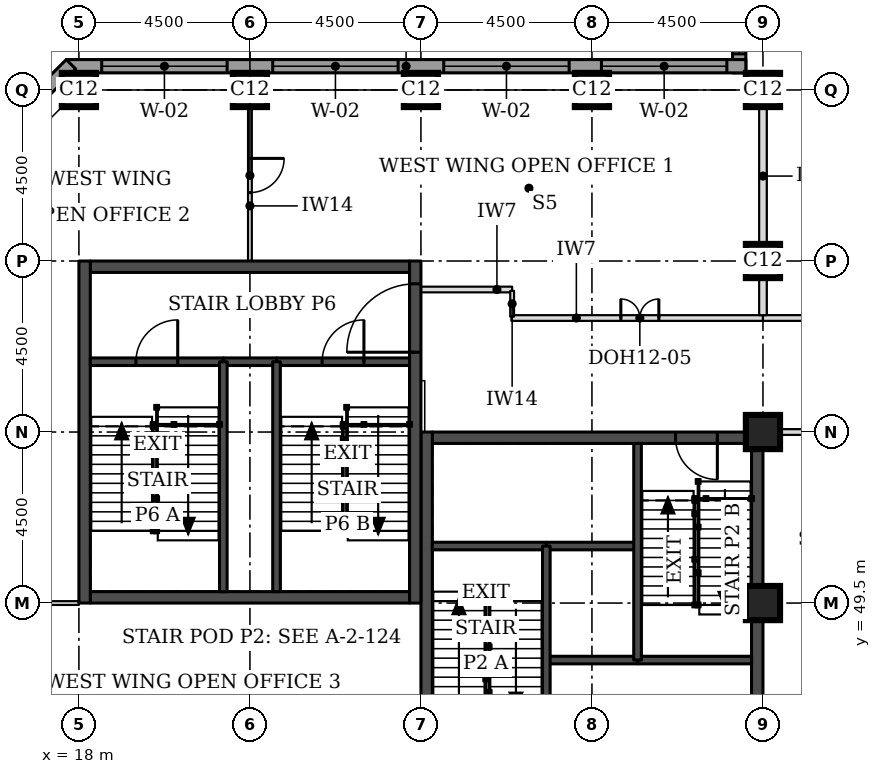
"""IFC4 building model, lengths in metres.
Left out: names, types, materials, properties, quantities, classifications, styles, units other than length and angle.
Written with IfcOpenShell. Run it as: python <this file> out.ifc"""

import sys

from ifc_helpers import new_model, si_unit, direction, frame, frame_2d, origin, origin_2d, place, context, subcontext, project, spatial, rectangle, extrude, element, fill, save


model = new_model("IFC4")
c1 = context("Model", 3, precision=1e-05, world=origin(), true_north=direction((0.0, 1.0)))
c2 = subcontext(c1, "Body", "Model", "MODEL_VIEW")
j1 = project(units=[si_unit("LENGTHUNIT", "METRE"), si_unit("PLANEANGLEUNIT", "RADIAN")], contexts=[c1])
p1 = place(None, origin())
s1 = spatial("IfcSite", under=j1, at=p1, CompositionType="ELEMENT")
p2 = place(p1, origin())
s2 = spatial("IfcBuilding", under=s1, at=p2, CompositionType="ELEMENT")
p3 = place(p2, frame((0.0, 0.0, 252.6)))
s3 = spatial("IfcBuildingStorey", under=s2, at=p3, CompositionType="ELEMENT", Elevation=252.6)
for number, where, z_axis, x_axis in (
    (1, (36.0, 49.5, 0.0), (0.0, 0.0, 1.0), (1.0, 0.0, 0.0)),
    (2, (36.0, 54.0, 0.0), (0.0, 0.0, 1.0), (1.0, 0.0, 0.0)),
    (3, (36.0, 58.5, 0.0), (0.0, 0.0, 1.0), (1.0, 0.0, 0.0)),
    (4, (18.0, 63.0, 0.0), (0.0, 0.0, 1.0), (1.0, 0.0, 0.0)),
    (5, (22.5, 63.0, 0.0), (0.0, 0.0, 1.0), (1.0, 0.0, 0.0)),
    (6, (27.0, 63.0, 0.0), (0.0, 0.0, 1.0), (1.0, 0.0, 0.0)),
    (7, (31.5, 63.0, 0.0), (0.0, 0.0, 1.0), (1.0, 0.0, 0.0)),
    (8, (36.0, 63.0, 0.0), (0.0, 0.0, 1.0), (1.0, 0.0, 0.0)),
):
    element("IfcColumn", number, at=place(p3, frame(where, z_axis=z_axis, x_axis=x_axis)), inside=s3, PredefinedType="COLUMN", context=c2, shape_type="SweptSolid", body=[
        extrude(rectangle(XDim=0.9, YDim=0.9, at=origin_2d()), origin(), (0.0, 0.0, 1.0), 3.7),
    ])
p4 = place(p3, frame((27.3, 53.85, 0.0), z_axis=(0.0, 0.0, 1.0), x_axis=(1.0, 0.0, 0.0)))
e9 = element("IfcWall", 9, at=p4, inside=s3, PredefinedType="SHEAR", context=c2, shape_type="SweptSolid", body=[
    extrude(rectangle(XDim=8.4, YDim=0.3, at=frame_2d((4.2, 0.0))), origin(), (0.0, 0.0, 1.0), 3.7),
])
p5 = place(p4, frame((6.4, 0.0, 0.0)))
e10 = element("IfcOpeningElement", 10, at=p5, cuts=e9, PredefinedType="OPENING", context=c2, shape_type="SweptSolid", body=[
    extrude(rectangle(XDim=1.1, YDim=2.1, at=frame_2d((0.55, 1.05))), frame((0.0, 0.16, 0.0), z_axis=(0.0, -1.0, 0.0), x_axis=(1.0, 0.0, 0.0)), (0.0, 0.0, 1.0), 0.32),
])
p6 = place(p3, frame((27.15, 45.0, 0.0), z_axis=(0.0, 0.0, 1.0), x_axis=(0.0, 1.0, 0.0)))
e11 = element("IfcWall", 11, at=p6, inside=s3, PredefinedType="SHEAR", context=c2, shape_type="SweptSolid", body=[
    extrude(rectangle(XDim=9.0, YDim=0.3, at=frame_2d((4.5, 0.0))), origin(), (0.0, 0.0, 1.0), 3.7),
])
p7 = place(p6, frame((0.4, 0.0, 0.0)))
e12 = element("IfcOpeningElement", 12, at=p7, cuts=e11, PredefinedType="OPENING", context=c2, shape_type="SweptSolid", body=[
    extrude(rectangle(XDim=1.1, YDim=2.1, at=frame_2d((0.55, 1.05))), frame((0.0, 0.16, 0.0), z_axis=(0.0, -1.0, 0.0), x_axis=(1.0, 0.0, 0.0)), (0.0, 0.0, 1.0), 0.32),
])
p8 = place(p3, frame((35.85, 45.0, 0.0), z_axis=(0.0, 0.0, 1.0), x_axis=(0.0, 1.0, 0.0)))
e13 = element("IfcWall", 13, at=p8, inside=s3, PredefinedType="SHEAR", context=c2, shape_type="SweptSolid", body=[
    extrude(rectangle(XDim=9.0, YDim=0.3, at=frame_2d((4.5, 0.0))), origin(), (0.0, 0.0, 1.0), 3.7),
])
for number, where, z_axis, x_axis in (
    (14, (18.3, 49.65, 0.0), (0.0, 0.0, 1.0), (1.0, 0.0, 0.0)),
    (15, (18.3, 58.35, 0.0), (0.0, 0.0, 1.0), (1.0, 0.0, 0.0)),
):
    element("IfcWall", number, at=place(p3, frame(where, z_axis=z_axis, x_axis=x_axis)), inside=s3, PredefinedType="SHEAR", context=c2, shape_type="SweptSolid", body=[
        extrude(rectangle(XDim=8.4, YDim=0.3, at=frame_2d((4.2, 0.0))), origin(), (0.0, 0.0, 1.0), 3.7),
    ])
p9 = place(p3, frame((18.15, 49.5, 0.0), z_axis=(0.0, 0.0, 1.0), x_axis=(0.0, 1.0, 0.0)))
e16 = element("IfcWall", 16, at=p9, inside=s3, PredefinedType="SHEAR", context=c2, shape_type="SweptSolid", body=[
    extrude(rectangle(XDim=9.0, YDim=0.3, at=frame_2d((4.5, 0.0))), origin(), (0.0, 0.0, 1.0), 3.7),
])
p10 = place(p3, frame((26.85, 49.5, 0.0), z_axis=(0.0, 0.0, 1.0), x_axis=(0.0, 1.0, 0.0)))
e17 = element("IfcWall", 17, at=p10, inside=s3, PredefinedType="SHEAR", context=c2, shape_type="SweptSolid", body=[
    extrude(rectangle(XDim=9.0, YDim=0.3, at=frame_2d((4.5, 0.0))), origin(), (0.0, 0.0, 1.0), 3.7),
])
p11 = place(p10, frame((6.6, 0.0, 0.0)))
e18 = element("IfcOpeningElement", 18, at=p11, cuts=e17, PredefinedType="OPENING", context=c2, shape_type="SweptSolid", body=[
    extrude(rectangle(XDim=1.8, YDim=2.1, at=frame_2d((0.9, 1.05))), frame((0.0, 0.16, 0.0), z_axis=(0.0, -1.0, 0.0), x_axis=(1.0, 0.0, 0.0)), (0.0, 0.0, 1.0), 0.32),
])
p12 = place(p3, frame((35.375, 76.831, 0.0), z_axis=(0.0, 0.0, 1.0), x_axis=(0.0, -1.0, 0.0)))
e19 = element("IfcWall", 19, at=p12, inside=s3, PredefinedType="STANDARD", context=c2, shape_type="SweptSolid", body=[
    extrude(rectangle(XDim=13.381, YDim=0.35, at=frame_2d((6.691, 0.0))), origin(), (0.0, 0.0, 1.0), 3.525),
])
p13 = place(p12, frame((0.931, 0.0, 0.9)))
e20 = element("IfcOpeningElement", 20, at=p13, cuts=e19, PredefinedType="OPENING", context=c2, shape_type="SweptSolid", body=[
    extrude(rectangle(XDim=3.3, YDim=1.9, at=frame_2d((1.65, 0.95))), frame((0.0, 0.185, 0.0), z_axis=(0.0, -1.0, 0.0), x_axis=(1.0, 0.0, 0.0)), (0.0, 0.0, 1.0), 0.37),
])
p14 = place(p12, frame((5.431, 0.0, 0.9)))
e21 = element("IfcOpeningElement", 21, at=p14, cuts=e19, PredefinedType="OPENING", context=c2, shape_type="SweptSolid", body=[
    extrude(rectangle(XDim=3.3, YDim=1.9, at=frame_2d((1.65, 0.95))), frame((0.0, 0.185, 0.0), z_axis=(0.0, -1.0, 0.0), x_axis=(1.0, 0.0, 0.0)), (0.0, 0.0, 1.0), 0.37),
])
p15 = place(p12, frame((9.581, 0.0, 0.9)))
e22 = element("IfcOpeningElement", 22, at=p15, cuts=e19, PredefinedType="OPENING", context=c2, shape_type="SweptSolid", body=[
    extrude(rectangle(XDim=3.3, YDim=1.9, at=frame_2d((1.65, 0.95))), frame((0.0, 0.185, 0.0), z_axis=(0.0, -1.0, 0.0), x_axis=(1.0, 0.0, 0.0)), (0.0, 0.0, 1.0), 0.37),
])
p16 = place(p3, frame((35.55, 63.625, 0.0), z_axis=(0.0, 0.0, 1.0), x_axis=(-1.0, 0.0, 0.0)))
e23 = element("IfcWall", 23, at=p16, inside=s3, PredefinedType="STANDARD", context=c2, shape_type="SweptSolid", body=[
    extrude(rectangle(XDim=17.881, YDim=0.35, at=frame_2d((8.941, 0.0))), origin(), (0.0, 0.0, 1.0), 3.525),
])
p17 = place(p16, frame((0.5, 0.0, 0.9)))
e24 = element("IfcOpeningElement", 24, at=p17, cuts=e23, PredefinedType="OPENING", context=c2, shape_type="SweptSolid", body=[
    extrude(rectangle(XDim=3.3, YDim=1.9, at=frame_2d((1.65, 0.95))), frame((0.0, 0.185, 0.0), z_axis=(0.0, -1.0, 0.0), x_axis=(1.0, 0.0, 0.0)), (0.0, 0.0, 1.0), 0.37),
])
p18 = place(p16, frame((4.65, 0.0, 0.9)))
e25 = element("IfcOpeningElement", 25, at=p18, cuts=e23, PredefinedType="OPENING", context=c2, shape_type="SweptSolid", body=[
    extrude(rectangle(XDim=3.3, YDim=1.9, at=frame_2d((1.65, 0.95))), frame((0.0, 0.185, 0.0), z_axis=(0.0, -1.0, 0.0), x_axis=(1.0, 0.0, 0.0)), (0.0, 0.0, 1.0), 0.37),
])
p19 = place(p16, frame((9.15, 0.0, 0.9)))
e26 = element("IfcOpeningElement", 26, at=p19, cuts=e23, PredefinedType="OPENING", context=c2, shape_type="SweptSolid", body=[
    extrude(rectangle(XDim=3.3, YDim=1.9, at=frame_2d((1.65, 0.95))), frame((0.0, 0.185, 0.0), z_axis=(0.0, -1.0, 0.0), x_axis=(1.0, 0.0, 0.0)), (0.0, 0.0, 1.0), 0.37),
])
p20 = place(p16, frame((13.65, 0.0, 0.9)))
e27 = element("IfcOpeningElement", 27, at=p20, cuts=e23, PredefinedType="OPENING", context=c2, shape_type="SweptSolid", body=[
    extrude(rectangle(XDim=3.3, YDim=1.9, at=frame_2d((1.65, 0.95))), frame((0.0, 0.185, 0.0), z_axis=(0.0, -1.0, 0.0), x_axis=(1.0, 0.0, 0.0)), (0.0, 0.0, 1.0), 0.37),
])
p21 = place(p3, frame((17.792, 63.676, 0.0), z_axis=(0.0, 0.0, 1.0), x_axis=(-0.707106781187, -0.707106781187, 0.0)))
e28 = element("IfcWall", 28, at=p21, inside=s3, PredefinedType="STANDARD", context=c2, shape_type="SweptSolid", body=[
    extrude(rectangle(XDim=7.027, YDim=0.35, at=frame_2d((3.513, 0.0))), origin(), (0.0, 0.0, 1.0), 3.525),
])
p22 = place(p21, frame((1.863, 0.0, 0.9)))
e29 = element("IfcOpeningElement", 29, at=p22, cuts=e28, PredefinedType="OPENING", context=c2, shape_type="SweptSolid", body=[
    extrude(rectangle(XDim=3.3, YDim=1.9, at=frame_2d((1.65, 0.95))), frame((0.0, 0.185, 0.0), z_axis=(0.0, -1.0, 0.0), x_axis=(1.0, 0.0, 0.0)), (0.0, 0.0, 1.0), 0.37),
])
p23 = place(p3, frame((36.45, 54.0, 0.0), z_axis=(0.0, 0.0, 1.0), x_axis=(1.0, 0.0, 0.0)))
e30 = element("IfcWall", 30, at=p23, inside=s3, PredefinedType="PARTITIONING", context=c2, shape_type="SweptSolid", body=[
    extrude(rectangle(XDim=5.625, YDim=0.15, at=frame_2d((2.812, 0.0))), origin(), (0.0, 0.0, 1.0), 3.55),
])
p24 = place(p3, frame((29.38, 57.0, 0.0), z_axis=(0.0, 0.0, 1.0), x_axis=(1.0, 0.0, 0.0)))
e31 = element("IfcWall", 31, at=p24, inside=s3, PredefinedType="PARTITIONING", context=c2, shape_type="SweptSolid", body=[
    extrude(rectangle(XDim=6.62, YDim=0.15, at=frame_2d((3.31, 0.0))), origin(), (0.0, 0.0, 1.0), 3.55),
])
p25 = place(p24, frame((2.88, 0.0, 0.0)))
e32 = element("IfcOpeningElement", 32, at=p25, cuts=e31, PredefinedType="OPENING", context=c2, shape_type="SweptSolid", body=[
    extrude(rectangle(XDim=1.0, YDim=2.1, at=frame_2d((0.5, 1.05))), frame((0.0, 0.085, 0.0), z_axis=(0.0, -1.0, 0.0), x_axis=(1.0, 0.0, 0.0)), (0.0, 0.0, 1.0), 0.17),
])
p26 = place(p3, frame((36.0, 57.0, 0.0), z_axis=(0.0, 0.0, 1.0), x_axis=(1.0, 0.0, 0.0)))
e33 = element("IfcWall", 33, at=p26, inside=s3, PredefinedType="PARTITIONING", context=c2, shape_type="SweptSolid", body=[
    extrude(rectangle(XDim=6.075, YDim=0.15, at=frame_2d((3.038, 0.0))), origin(), (0.0, 0.0, 1.0), 3.55),
])
p27 = place(p26, frame((2.55, 0.0, 0.0)))
e34 = element("IfcOpeningElement", 34, at=p27, cuts=e33, PredefinedType="OPENING", context=c2, shape_type="SweptSolid", body=[
    extrude(rectangle(XDim=1.0, YDim=2.1, at=frame_2d((0.5, 1.05))), frame((0.0, 0.085, 0.0), z_axis=(0.0, -1.0, 0.0), x_axis=(1.0, 0.0, 0.0)), (0.0, 0.0, 1.0), 0.17),
])
p28 = place(p3, frame((36.0, 57.075, 0.0), z_axis=(0.0, 0.0, 1.0), x_axis=(0.0, 1.0, 0.0)))
e35 = element("IfcWall", 35, at=p28, inside=s3, PredefinedType="PARTITIONING", context=c2, shape_type="SweptSolid", body=[
    extrude(rectangle(XDim=0.975, YDim=0.2, at=frame_2d((0.488, 0.0))), origin(), (0.0, 0.0, 1.0), 2.8),
])
p29 = place(p3, frame((36.0, 58.92, 0.0), z_axis=(0.0, 0.0, 1.0), x_axis=(0.0, 1.0, 0.0)))
e36 = element("IfcWall", 36, at=p29, inside=s3, PredefinedType="PARTITIONING", context=c2, shape_type="SweptSolid", body=[
    extrude(rectangle(XDim=3.63, YDim=0.2, at=frame_2d((1.815, 0.0))), origin(), (0.0, 0.0, 1.0), 2.8),
])
p30 = place(p3, frame((22.5, 63.0, 0.0), z_axis=(0.0, 0.0, 1.0), x_axis=(0.0, -1.0, 0.0)))
e37 = element("IfcWall", 37, at=p30, inside=s3, PredefinedType="PARTITIONING", context=c2, shape_type="SweptSolid", body=[
    extrude(rectangle(XDim=4.5, YDim=0.1, at=frame_2d((2.25, 0.0))), origin(), (0.0, 0.0, 1.0), 3.55),
])
p31 = place(p30, frame((1.8, 0.0, 0.0)))
e38 = element("IfcOpeningElement", 38, at=p31, cuts=e37, PredefinedType="OPENING", context=c2, shape_type="SweptSolid", body=[
    extrude(rectangle(XDim=0.9, YDim=2.1, at=frame_2d((0.45, 1.05))), frame((0.0, 0.06, 0.0), z_axis=(0.0, -1.0, 0.0), x_axis=(1.0, 0.0, 0.0)), (0.0, 0.0, 1.0), 0.12),
])
p32 = place(p3, frame((13.5, 49.5, 0.0), z_axis=(0.0, 0.0, 1.0), x_axis=(1.0, 0.0, 0.0)))
e39 = element("IfcWall", 39, at=p32, inside=s3, PredefinedType="PARTITIONING", context=c2, shape_type="SweptSolid", body=[
    extrude(rectangle(XDim=4.5, YDim=0.1, at=frame_2d((2.25, 0.0))), origin(), (0.0, 0.0, 1.0), 3.55),
])
p33 = place(p32, frame((1.8, 0.0, 0.0)))
e40 = element("IfcOpeningElement", 40, at=p33, cuts=e39, PredefinedType="OPENING", context=c2, shape_type="SweptSolid", body=[
    extrude(rectangle(XDim=0.9, YDim=2.1, at=frame_2d((0.45, 1.05))), frame((0.0, 0.06, 0.0), z_axis=(0.0, -1.0, 0.0), x_axis=(1.0, 0.0, 0.0)), (0.0, 0.0, 1.0), 0.12),
])
p34 = place(p3, frame((27.0, 57.75, 0.0), z_axis=(0.0, 0.0, 1.0), x_axis=(1.0, 0.0, 0.0)))
e41 = element("IfcWall", 41, at=p34, inside=s3, PredefinedType="PARTITIONING", context=c2, shape_type="SweptSolid", body=[
    extrude(rectangle(XDim=2.4, YDim=0.15, at=frame_2d((1.2, 0.0))), origin(), (0.0, 0.0, 1.0), 3.55),
])
p35 = place(p3, frame((29.4, 57.715, 0.0), z_axis=(0.0, 0.0, 1.0), x_axis=(0.0, -1.0, 0.0)))
e42 = element("IfcWall", 42, at=p35, inside=s3, PredefinedType="PARTITIONING", context=c2, shape_type="SweptSolid", body=[
    extrude(rectangle(XDim=0.68, YDim=0.1, at=frame_2d((0.34, 0.0))), origin(), (0.0, 0.0, 1.0), 3.55),
])
p36 = place(p3, frame((30.3, 48.0, 0.0), z_axis=(0.0, 0.0, 1.0), x_axis=(1.0, 0.0, 0.0)))
e43 = element("IfcWall", 43, at=p36, inside=s3, PredefinedType="SOLIDWALL", context=c2, shape_type="SweptSolid", body=[
    extrude(rectangle(XDim=2.4, YDim=0.2, at=frame_2d((1.2, 0.0))), origin(), (0.0, 0.0, 1.0), 3.55),
])
p37 = place(p3, frame((32.7, 48.0, 0.0), z_axis=(0.0, 0.0, 1.0), x_axis=(1.0, 0.0, 0.0)))
e44 = element("IfcWall", 44, at=p37, inside=s3, PredefinedType="SOLIDWALL", context=c2, shape_type="SweptSolid", body=[
    extrude(rectangle(XDim=3.0, YDim=0.2, at=frame_2d((1.5, 0.0))), origin(), (0.0, 0.0, 1.0), 3.55),
])
p38 = place(p3, frame((30.3, 51.0, 0.0), z_axis=(0.0, 0.0, 1.0), x_axis=(1.0, 0.0, 0.0)))
e45 = element("IfcWall", 45, at=p38, inside=s3, PredefinedType="SOLIDWALL", context=c2, shape_type="SweptSolid", body=[
    extrude(rectangle(XDim=2.4, YDim=0.2, at=frame_2d((1.2, 0.0))), origin(), (0.0, 0.0, 1.0), 3.7),
])
p39 = place(p3, frame((27.3, 51.0, 0.0), z_axis=(0.0, 0.0, 1.0), x_axis=(1.0, 0.0, 0.0)))
e46 = element("IfcWall", 46, at=p39, inside=s3, PredefinedType="SOLIDWALL", context=c2, shape_type="SweptSolid", body=[
    extrude(rectangle(XDim=3.0, YDim=0.2, at=frame_2d((1.5, 0.0))), origin(), (0.0, 0.0, 1.0), 3.55),
])
for number, where, z_axis, x_axis in (
    (47, (30.3, 45.3, 0.0), (0.0, 0.0, 1.0), (0.0, 1.0, 0.0)),
    (48, (32.7, 48.0, 0.0), (0.0, 0.0, 1.0), (0.0, 1.0, 0.0)),
):
    element("IfcWall", number, at=place(p3, frame(where, z_axis=z_axis, x_axis=x_axis)), inside=s3, PredefinedType="SOLIDWALL", context=c2, shape_type="SweptSolid", body=[
        extrude(rectangle(XDim=5.7, YDim=0.2, at=frame_2d((2.85, 0.0))), origin(), (0.0, 0.0, 1.0), 3.55),
    ])
p40 = place(p3, frame((21.8, 55.85, 0.0), z_axis=(0.0, 0.0, 1.0), x_axis=(1.0, 0.0, 0.0)))
e49 = element("IfcWall", 49, at=p40, inside=s3, PredefinedType="SOLIDWALL", context=c2, shape_type="SweptSolid", body=[
    extrude(rectangle(XDim=1.4, YDim=0.2, at=frame_2d((0.7, 0.0))), origin(), (0.0, 0.0, 1.0), 3.55),
])
p41 = place(p3, frame((18.3, 55.85, 0.0), z_axis=(0.0, 0.0, 1.0), x_axis=(1.0, 0.0, 0.0)))
e50 = element("IfcWall", 50, at=p41, inside=s3, PredefinedType="SOLIDWALL", context=c2, shape_type="SweptSolid", body=[
    extrude(rectangle(XDim=3.5, YDim=0.2, at=frame_2d((1.75, 0.0))), origin(), (0.0, 0.0, 1.0), 3.55),
])
p42 = place(p41, frame((1.2, 0.0, 0.0)))
e51 = element("IfcOpeningElement", 51, at=p42, cuts=e50, PredefinedType="OPENING", context=c2, shape_type="SweptSolid", body=[
    extrude(rectangle(XDim=1.1, YDim=2.1, at=frame_2d((0.55, 1.05))), frame((0.0, 0.11, 0.0), z_axis=(0.0, -1.0, 0.0), x_axis=(1.0, 0.0, 0.0)), (0.0, 0.0, 1.0), 0.22),
])
p43 = place(p3, frame((23.2, 55.85, 0.0), z_axis=(0.0, 0.0, 1.0), x_axis=(1.0, 0.0, 0.0)))
e52 = element("IfcWall", 52, at=p43, inside=s3, PredefinedType="SOLIDWALL", context=c2, shape_type="SweptSolid", body=[
    extrude(rectangle(XDim=3.5, YDim=0.2, at=frame_2d((1.75, 0.0))), origin(), (0.0, 0.0, 1.0), 3.55),
])
p44 = place(p43, frame((1.2, 0.0, 0.0)))
e53 = element("IfcOpeningElement", 53, at=p44, cuts=e52, PredefinedType="OPENING", context=c2, shape_type="SweptSolid", body=[
    extrude(rectangle(XDim=1.1, YDim=2.1, at=frame_2d((0.55, 1.05))), frame((0.0, 0.11, 0.0), z_axis=(0.0, -1.0, 0.0), x_axis=(1.0, 0.0, 0.0)), (0.0, 0.0, 1.0), 0.22),
])
for number, where, z_axis, x_axis in (
    (54, (21.8, 49.8, 0.0), (0.0, 0.0, 1.0), (0.0, 1.0, 0.0)),
    (55, (23.2, 49.8, 0.0), (0.0, 0.0, 1.0), (0.0, 1.0, 0.0)),
):
    element("IfcWall", number, at=place(p3, frame(where, z_axis=z_axis, x_axis=x_axis)), inside=s3, PredefinedType="SOLIDWALL", context=c2, shape_type="SweptSolid", body=[
        extrude(rectangle(XDim=6.05, YDim=0.2, at=frame_2d((3.025, 0.0))), origin(), (0.0, 0.0, 1.0), 3.55),
    ])
p45 = place(p15, origin())
e56 = element("IfcWindow", 56, at=p45, inside=s3, PartitioningType="SINGLE_PANEL", PredefinedType="WINDOW", context=c2, shape_type="SweptSolid", body=[
    extrude(rectangle(XDim=3.3, YDim=1.9, at=frame_2d((1.65, 0.95))), frame((0.0, 0.085, 0.0), z_axis=(0.0, -1.0, 0.0), x_axis=(1.0, 0.0, 0.0)), (0.0, 0.0, 1.0), 0.06),
])
fill(e22, e56)
p46 = place(p17, origin())
e57 = element("IfcWindow", 57, at=p46, inside=s3, PartitioningType="SINGLE_PANEL", PredefinedType="WINDOW", context=c2, shape_type="SweptSolid", body=[
    extrude(rectangle(XDim=3.3, YDim=1.9, at=frame_2d((1.65, 0.95))), frame((0.0, 0.085, 0.0), z_axis=(0.0, -1.0, 0.0), x_axis=(1.0, 0.0, 0.0)), (0.0, 0.0, 1.0), 0.06),
])
fill(e24, e57)
p47 = place(p18, origin())
e58 = element("IfcWindow", 58, at=p47, inside=s3, PartitioningType="SINGLE_PANEL", PredefinedType="WINDOW", context=c2, shape_type="SweptSolid", body=[
    extrude(rectangle(XDim=3.3, YDim=1.9, at=frame_2d((1.65, 0.95))), frame((0.0, 0.085, 0.0), z_axis=(0.0, -1.0, 0.0), x_axis=(1.0, 0.0, 0.0)), (0.0, 0.0, 1.0), 0.06),
])
fill(e25, e58)
p48 = place(p19, origin())
e59 = element("IfcWindow", 59, at=p48, inside=s3, PartitioningType="SINGLE_PANEL", PredefinedType="WINDOW", context=c2, shape_type="SweptSolid", body=[
    extrude(rectangle(XDim=3.3, YDim=1.9, at=frame_2d((1.65, 0.95))), frame((0.0, 0.085, 0.0), z_axis=(0.0, -1.0, 0.0), x_axis=(1.0, 0.0, 0.0)), (0.0, 0.0, 1.0), 0.06),
])
fill(e26, e59)
p49 = place(p20, origin())
e60 = element("IfcWindow", 60, at=p49, inside=s3, PartitioningType="SINGLE_PANEL", PredefinedType="WINDOW", context=c2, shape_type="SweptSolid", body=[
    extrude(rectangle(XDim=3.3, YDim=1.9, at=frame_2d((1.65, 0.95))), frame((0.0, 0.085, 0.0), z_axis=(0.0, -1.0, 0.0), x_axis=(1.0, 0.0, 0.0)), (0.0, 0.0, 1.0), 0.06),
])
fill(e27, e60)
p50 = place(p25, origin())
e61 = element("IfcDoor", 61, at=p50, inside=s3, OperationType="DOUBLE_DOOR_SINGLE_SWING", PredefinedType="DOOR", context=c2, shape_type="SweptSolid", body=[
    extrude(rectangle(XDim=1.0, YDim=2.1, at=frame_2d((0.5, 1.05))), frame((0.0, 0.025, 0.0), z_axis=(0.0, -1.0, 0.0), x_axis=(1.0, 0.0, 0.0)), (0.0, 0.0, 1.0), 0.05),
])
fill(e32, e61)
p51 = place(p31, origin())
e62 = element("IfcDoor", 62, at=p51, inside=s3, OperationType="SINGLE_SWING_LEFT", PredefinedType="DOOR", context=c2, shape_type="SweptSolid", body=[
    extrude(rectangle(XDim=0.9, YDim=2.1, at=frame_2d((0.45, 1.05))), frame((0.0, 0.025, 0.0), z_axis=(0.0, -1.0, 0.0), x_axis=(1.0, 0.0, 0.0)), (0.0, 0.0, 1.0), 0.05),
])
fill(e38, e62)
p52 = place(p5, frame((1.1, 0.0, 0.0), z_axis=(0.0, 0.0, 1.0), x_axis=(-1.0, 0.0, 0.0)))
e63 = element("IfcDoor", 63, at=p52, inside=s3, OperationType="SINGLE_SWING_LEFT", PredefinedType="DOOR", context=c2, shape_type="SweptSolid", body=[
    extrude(rectangle(XDim=1.1, YDim=2.1, at=frame_2d((0.55, 1.05))), frame((0.0, 0.025, 0.0), z_axis=(0.0, -1.0, 0.0), x_axis=(1.0, 0.0, 0.0)), (0.0, 0.0, 1.0), 0.05),
])
fill(e10, e63)
p53 = place(p42, origin())
e64 = element("IfcDoor", 64, at=p53, inside=s3, OperationType="SINGLE_SWING_RIGHT", PredefinedType="DOOR", context=c2, shape_type="SweptSolid", body=[
    extrude(rectangle(XDim=1.1, YDim=2.1, at=frame_2d((0.55, 1.05))), frame((0.0, 0.025, 0.0), z_axis=(0.0, -1.0, 0.0), x_axis=(1.0, 0.0, 0.0)), (0.0, 0.0, 1.0), 0.05),
])
fill(e51, e64)
p54 = place(p44, origin())
e65 = element("IfcDoor", 65, at=p54, inside=s3, OperationType="SINGLE_SWING_RIGHT", PredefinedType="DOOR", context=c2, shape_type="SweptSolid", body=[
    extrude(rectangle(XDim=1.1, YDim=2.1, at=frame_2d((0.55, 1.05))), frame((0.0, 0.025, 0.0), z_axis=(0.0, -1.0, 0.0), x_axis=(1.0, 0.0, 0.0)), (0.0, 0.0, 1.0), 0.05),
])
fill(e53, e65)
p55 = place(p11, origin())
e66 = element("IfcDoor", 66, at=p55, inside=s3, OperationType="SINGLE_SWING_LEFT", PredefinedType="DOOR", context=c2, shape_type="SweptSolid", body=[
    extrude(rectangle(XDim=1.8, YDim=2.1, at=frame_2d((0.9, 1.05))), frame((0.0, 0.025, 0.0), z_axis=(0.0, -1.0, 0.0), x_axis=(1.0, 0.0, 0.0)), (0.0, 0.0, 1.0), 0.05),
])
fill(e18, e66)
save(model, sys.argv[1])
